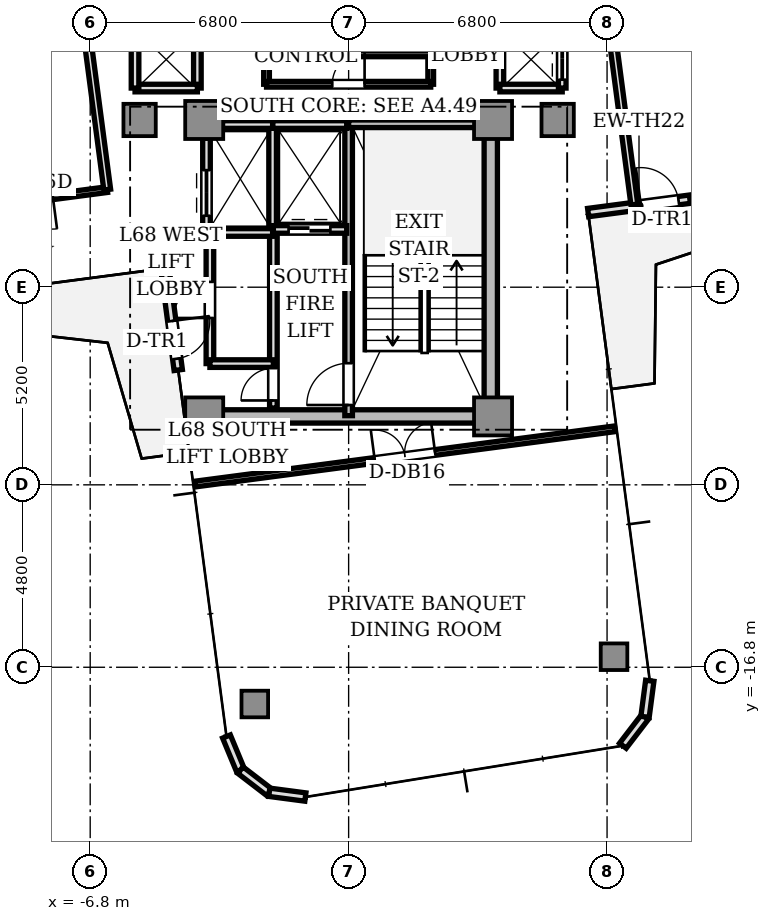
"""IFC4 building model, lengths in metres.
Left out: names, types, materials, properties, quantities, classifications, styles, units other than length and angle.
Written with IfcOpenShell. Run it as: python <this file> out.ifc"""

import sys

from ifc_helpers import new_model, si_unit, direction, frame, frame_2d, origin, origin_2d, place, context, subcontext, project, spatial, rectangle, extrude, source, transform, mapped, element, fill, save


model = new_model("IFC4")
c1 = context("Model", 3, precision=1e-05, world=origin(), true_north=direction((0.0, 1.0)))
c2 = subcontext(c1, "Body", "Model", "MODEL_VIEW")
j1 = project(units=[si_unit("LENGTHUNIT", "METRE"), si_unit("PLANEANGLEUNIT", "RADIAN")], contexts=[c1])
p1 = place(None, origin())
s1 = spatial("IfcSite", under=j1, at=p1, CompositionType="ELEMENT")
p2 = place(p1, origin())
s2 = spatial("IfcBuilding", under=s1, at=p2, CompositionType="ELEMENT")
p3 = place(p2, frame((0.0, 0.0, 244.5)))
s3 = spatial("IfcBuildingStorey", under=s2, at=p3, CompositionType="ELEMENT", Elevation=244.5)
p4 = place(p3, frame((-3.55, -10.2, 0.0), z_axis=(0.0, 0.0, 1.0), x_axis=(1.0, 0.0, 0.0)))
e1 = element("IfcWall", 1, at=p4, inside=s3, PredefinedType="SHEAR", context=c2, shape_type="SweptSolid", body=[
    extrude(rectangle(XDim=7.1, YDim=0.35, at=frame_2d((3.55, 0.0))), origin(), (0.0, 0.0, 1.0), 3.11),
])
p5 = place(p3, frame((3.74, -9.75, 0.0), z_axis=(0.0, 0.0, 1.0), x_axis=(0.0, 1.0, 0.0)))
e2 = element("IfcWall", 2, at=p5, inside=s3, PredefinedType="SHEAR", context=c2, shape_type="SweptSolid", body=[
    extrude(rectangle(XDim=6.9, YDim=0.35, at=frame_2d((3.45, 0.0))), origin(), (0.0, 0.0, 1.0), 3.11),
])
m1 = source(origin(), c2, "Body", "SweptSolid", [
    extrude(rectangle(XDim=1.0, YDim=1.0, at=origin_2d()), origin(), (0.0, 0.0, 1.0), 3.11),
])
for number, where, z_axis, x_axis in (
    (3, (-3.8, -2.4, 0.0), (0.0, 0.0, 1.0), (1.0, 0.0, 0.0)),
    (4, (3.8, -2.4, 0.0), (0.0, 0.0, 1.0), (1.0, 0.0, 0.0)),
    (5, (-3.8, -10.2, 0.0), (0.0, 0.0, 1.0), (1.0, 0.0, 0.0)),
    (6, (3.8, -10.2, 0.0), (0.0, 0.0, 1.0), (1.0, 0.0, 0.0)),
):
    element("IfcColumn", number, at=place(p3, frame(where, z_axis=z_axis, x_axis=x_axis)), inside=s3, PredefinedType="COLUMN", context=c2, shape_type="MappedRepresentation", body=[
        mapped(m1, transform((0.0, 0.0, 0.0), scale=1.0)),
    ])
m2 = source(origin(), c2, "Body", "SweptSolid", [
    extrude(rectangle(XDim=0.85, YDim=0.85, at=origin_2d()), origin(), (0.0, 0.0, 1.0), 3.11),
])
for number, where, z_axis, x_axis in (
    (7, (5.5, -2.4, 0.0), (0.0, 0.0, 1.0), (1.0, 0.0, 0.0)),
    (8, (-5.5, -2.4, 0.0), (0.0, 0.0, 1.0), (1.0, 0.0, 0.0)),
):
    element("IfcColumn", number, at=place(p3, frame(where, z_axis=z_axis, x_axis=x_axis)), inside=s3, PredefinedType="COLUMN", context=c2, shape_type="MappedRepresentation", body=[
        mapped(m2, transform((0.0, 0.0, 0.0), scale=1.0)),
    ])
m3 = source(origin(), c2, "Body", "SweptSolid", [
    extrude(rectangle(XDim=0.7, YDim=0.7, at=origin_2d()), origin(), (0.0, 0.0, 1.0), 3.11),
])
for number, where, z_axis, x_axis in (
    (9, (-2.469, -17.767, 0.0), (0.0, 0.0, 1.0), (1.0, 0.0, 0.0)),
    (10, (6.983, -16.523, 0.0), (0.0, 0.0, 1.0), (1.0, 0.0, 0.0)),
):
    element("IfcColumn", number, at=place(p3, frame(where, z_axis=z_axis, x_axis=x_axis)), inside=s3, PredefinedType="COLUMN", context=c2, shape_type="MappedRepresentation", body=[
        mapped(m3, transform((0.0, 0.0, 0.0), scale=1.0)),
    ])
p6 = place(p3, frame((6.302, -4.836, 0.0), z_axis=(0.0, 0.0, 1.0), x_axis=(0.991451525486, 0.130475563272, 0.0)))
e11 = element("IfcWall", 11, at=p6, inside=s3, PredefinedType="STANDARD", context=c2, shape_type="SweptSolid", body=[
    extrude(rectangle(XDim=2.7, YDim=0.22, at=frame_2d((1.35, 0.0))), origin(), (0.0, 0.0, 1.0), 3.11),
])
p7 = place(p6, frame((1.4, 0.0, 0.0)))
e12 = element("IfcOpeningElement", 12, at=p7, cuts=e11, PredefinedType="OPENING", context=c2, shape_type="SweptSolid", body=[
    extrude(rectangle(XDim=1.0, YDim=2.2, at=frame_2d((0.5, 1.1))), frame((0.0, 0.12, 0.0), z_axis=(0.0, -1.0, 0.0), x_axis=(1.0, 0.0, 0.0)), (0.0, 0.0, 1.0), 0.24),
])
p8 = place(p3, frame((-4.836, -6.302, 0.0), z_axis=(0.0, 0.0, 1.0), x_axis=(0.130475563272, -0.991451525486, 0.0)))
e13 = element("IfcWall", 13, at=p8, inside=s3, PredefinedType="STANDARD", context=c2, shape_type="SweptSolid", body=[
    extrude(rectangle(XDim=2.7, YDim=0.22, at=frame_2d((1.35, 0.0))), origin(), (0.0, 0.0, 1.0), 3.11),
])
p9 = place(p8, frame((1.4, 0.0, 0.0)))
e14 = element("IfcOpeningElement", 14, at=p9, cuts=e13, PredefinedType="OPENING", context=c2, shape_type="SweptSolid", body=[
    extrude(rectangle(XDim=1.0, YDim=2.2, at=frame_2d((0.5, 1.1))), frame((0.0, 0.12, 0.0), z_axis=(0.0, -1.0, 0.0), x_axis=(1.0, 0.0, 0.0)), (0.0, 0.0, 1.0), 0.24),
])
for number, where, z_axis, x_axis in (
    (15, (-3.214, -18.622, 0.0), (0.0, 0.0, 1.0), (0.383, -0.924, 0.0)),
    (16, (-2.847, -19.507, 0.0), (0.0, 0.0, 1.0), (0.793, -0.609, 0.0)),
    (17, (-2.088, -20.09, 0.0), (0.0, 0.0, 1.0), (0.991, -0.131, 0.0)),
    (18, (7.216, -18.865, 0.0), (0.0, 0.0, 1.0), (0.609, 0.793, 0.0)),
    (19, (7.799, -18.105, 0.0), (0.0, 0.0, 1.0), (0.131, 0.991, 0.0)),
):
    element("IfcWall", number, at=place(p3, frame(where, z_axis=z_axis, x_axis=x_axis)), inside=s3, PredefinedType="STANDARD", context=c2, shape_type="SweptSolid", body=[
        extrude(rectangle(XDim=0.958, YDim=0.22, at=frame_2d((0.479, 0.0))), origin(), (0.0, 0.0, 1.0), 3.11),
    ])
p10 = place(p3, frame((0.0, -10.18, 0.0), z_axis=(0.0, 0.0, 1.0), x_axis=(0.0, 1.0, 0.0)))
e20 = element("IfcWall", 20, at=p10, inside=s3, PredefinedType="SOLIDWALL", context=c2, shape_type="SweptSolid", body=[
    extrude(rectangle(XDim=7.68, YDim=0.2, at=frame_2d((3.84, 0.0))), origin(), (0.0, 0.0, 1.0), 3.11),
])
p11 = place(p10, frame((0.28, 0.0, 0.0)))
e21 = element("IfcOpeningElement", 21, at=p11, cuts=e20, PredefinedType="OPENING", context=c2, shape_type="SweptSolid", body=[
    extrude(rectangle(XDim=1.1, YDim=2.15, at=frame_2d((0.55, 1.075))), frame((0.0, 0.11, 0.0), z_axis=(0.0, -1.0, 0.0), x_axis=(1.0, 0.0, 0.0)), (0.0, 0.0, 1.0), 0.22),
])
p12 = place(p3, frame((0.0, -2.5, 0.0), z_axis=(0.0, 0.0, 1.0), x_axis=(1.0, 0.0, 0.0)))
e22 = element("IfcWall", 22, at=p12, inside=s3, PredefinedType="SOLIDWALL", context=c2, shape_type="SweptSolid", body=[
    extrude(rectangle(XDim=3.72, YDim=0.2, at=frame_2d((1.86, 0.0))), origin(), (0.0, 0.0, 1.0), 3.11),
])
p13 = place(p3, frame((-1.98, -9.98, 0.0), z_axis=(0.0, 0.0, 1.0), x_axis=(0.0, 1.0, 0.0)))
e23 = element("IfcWall", 23, at=p13, inside=s3, PredefinedType="SOLIDWALL", context=c2, shape_type="SweptSolid", body=[
    extrude(rectangle(XDim=4.66, YDim=0.2, at=frame_2d((2.33, 0.0))), origin(), (0.0, 0.0, 1.0), 2.66),
])
p14 = place(p13, frame((0.2, 0.0, 0.0)))
e24 = element("IfcOpeningElement", 24, at=p14, cuts=e23, PredefinedType="OPENING", context=c2, shape_type="SweptSolid", body=[
    extrude(rectangle(XDim=0.85, YDim=2.1, at=frame_2d((0.425, 1.05))), frame((0.0, 0.11, 0.0), z_axis=(0.0, -1.0, 0.0), x_axis=(1.0, 0.0, 0.0)), (0.0, 0.0, 1.0), 0.22),
])
p15 = place(p3, frame((-2.0, -5.28, 0.0), z_axis=(0.0, 0.0, 1.0), x_axis=(0.0, 1.0, 0.0)))
e25 = element("IfcWall", 25, at=p15, inside=s3, PredefinedType="SOLIDWALL", context=c2, shape_type="SweptSolid", body=[
    extrude(rectangle(XDim=2.78, YDim=0.2, at=frame_2d((1.39, 0.0))), origin(), (0.0, 0.0, 1.0), 2.66),
])
p16 = place(p3, frame((-2.0, -2.52, 0.0), z_axis=(0.0, 0.0, 1.0), x_axis=(1.0, 0.0, 0.0)))
e26 = element("IfcWall", 26, at=p16, inside=s3, PredefinedType="SOLIDWALL", context=c2, shape_type="SweptSolid", body=[
    extrude(rectangle(XDim=1.95, YDim=0.2, at=frame_2d((0.975, 0.0))), origin(), (0.0, 0.0, 1.0), 2.66),
])
p17 = place(p3, frame((-1.98, -5.28, 0.0), z_axis=(0.0, 0.0, 1.0), x_axis=(1.0, 0.0, 0.0)))
e27 = element("IfcWall", 27, at=p17, inside=s3, PredefinedType="SOLIDWALL", context=c2, shape_type="SweptSolid", body=[
    extrude(rectangle(XDim=1.93, YDim=0.2, at=frame_2d((0.965, 0.0))), origin(), (0.0, 0.0, 1.0), 2.66),
])
p18 = place(p17, frame((0.4, 0.0, 0.0)))
e28 = element("IfcOpeningElement", 28, at=p18, cuts=e27, PredefinedType="OPENING", context=c2, shape_type="SweptSolid", body=[
    extrude(rectangle(XDim=1.1, YDim=2.2, at=frame_2d((0.55, 1.1))), frame((0.0, 0.11, 0.0), z_axis=(0.0, -1.0, 0.0), x_axis=(1.0, 0.0, 0.0)), (0.0, 0.0, 1.0), 0.22),
])
p19 = place(p3, frame((-3.32, -2.52, 0.0), z_axis=(0.0, 0.0, 1.0), x_axis=(1.0, 0.0, 0.0)))
e29 = element("IfcWall", 29, at=p19, inside=s3, PredefinedType="SOLIDWALL", context=c2, shape_type="SweptSolid", body=[
    extrude(rectangle(XDim=1.32, YDim=0.2, at=frame_2d((0.66, 0.0))), origin(), (0.0, 0.0, 1.0), 2.66),
])
p20 = place(p3, frame((-3.74, -5.36, 0.0), z_axis=(0.0, 0.0, 1.0), x_axis=(1.0, 0.0, 0.0)))
e30 = element("IfcWall", 30, at=p20, inside=s3, PredefinedType="SOLIDWALL", context=c2, shape_type="SweptSolid", body=[
    extrude(rectangle(XDim=1.74, YDim=0.2, at=frame_2d((0.87, 0.0))), origin(), (0.0, 0.0, 1.0), 2.66),
])
p21 = place(p3, frame((-3.74, -5.36, 0.0), z_axis=(0.0, 0.0, 1.0), x_axis=(0.0, 1.0, 0.0)))
e31 = element("IfcWall", 31, at=p21, inside=s3, PredefinedType="SOLIDWALL", context=c2, shape_type="SweptSolid", body=[
    extrude(rectangle(XDim=2.48, YDim=0.2, at=frame_2d((1.24, 0.0))), origin(), (0.0, 0.0, 1.0), 2.66),
])
p22 = place(p21, frame((0.44, 0.0, 0.0)))
e32 = element("IfcOpeningElement", 32, at=p22, cuts=e31, PredefinedType="OPENING", context=c2, shape_type="SweptSolid", body=[
    extrude(rectangle(XDim=1.2, YDim=2.2, at=frame_2d((0.6, 1.1))), frame((0.0, 0.11, 0.0), z_axis=(0.0, -1.0, 0.0), x_axis=(1.0, 0.0, 0.0)), (0.0, 0.0, 1.0), 0.22),
])
p23 = place(p3, frame((3.98, -1.56, 0.0), z_axis=(0.0, 0.0, 1.0), x_axis=(0.0, 1.0, 0.0)))
e33 = element("IfcWall", 33, at=p23, inside=s3, PredefinedType="SOLIDWALL", context=c2, shape_type="SweptSolid", body=[
    extrude(rectangle(XDim=3.12, YDim=0.2, at=frame_2d((1.56, 0.0))), origin(), (0.0, 0.0, 1.0), 2.33),
])
p24 = place(p3, frame((3.98, -1.56, 0.0), z_axis=(0.0, 0.0, 1.0), x_axis=(1.0, 0.0, 0.0)))
e34 = element("IfcWall", 34, at=p24, inside=s3, PredefinedType="SOLIDWALL", context=c2, shape_type="SweptSolid", body=[
    extrude(rectangle(XDim=1.64, YDim=0.2, at=frame_2d((0.82, 0.0))), origin(), (0.0, 0.0, 1.0), 2.66),
])
p25 = place(p3, frame((5.62, -1.56, 0.0), z_axis=(0.0, 0.0, 1.0), x_axis=(0.0, 1.0, 0.0)))
e35 = element("IfcWall", 35, at=p25, inside=s3, PredefinedType="SOLIDWALL", context=c2, shape_type="SweptSolid", body=[
    extrude(rectangle(XDim=1.56, YDim=0.2, at=frame_2d((0.78, 0.0))), origin(), (0.0, 0.0, 1.0), 2.66),
])
p26 = place(p25, frame((0.22, 0.0, 0.0)))
e36 = element("IfcOpeningElement", 36, at=p26, cuts=e35, PredefinedType="OPENING", context=c2, shape_type="SweptSolid", body=[
    extrude(rectangle(XDim=1.1, YDim=2.2, at=frame_2d((0.55, 1.1))), frame((0.0, 0.11, 0.0), z_axis=(0.0, -1.0, 0.0), x_axis=(1.0, 0.0, 0.0)), (0.0, 0.0, 1.0), 0.22),
])
p27 = place(p3, frame((-3.98, -1.56, 0.0), z_axis=(0.0, 0.0, 1.0), x_axis=(0.0, 1.0, 0.0)))
e37 = element("IfcWall", 37, at=p27, inside=s3, PredefinedType="SOLIDWALL", context=c2, shape_type="SweptSolid", body=[
    extrude(rectangle(XDim=3.12, YDim=0.2, at=frame_2d((1.56, 0.0))), origin(), (0.0, 0.0, 1.0), 2.33),
])
p28 = place(p3, frame((-5.62, -1.56, 0.0), z_axis=(0.0, 0.0, 1.0), x_axis=(1.0, 0.0, 0.0)))
e38 = element("IfcWall", 38, at=p28, inside=s3, PredefinedType="SOLIDWALL", context=c2, shape_type="SweptSolid", body=[
    extrude(rectangle(XDim=1.64, YDim=0.2, at=frame_2d((0.82, 0.0))), origin(), (0.0, 0.0, 1.0), 2.66),
])
p29 = place(p3, frame((-5.62, -1.56, 0.0), z_axis=(0.0, 0.0, 1.0), x_axis=(0.0, 1.0, 0.0)))
e39 = element("IfcWall", 39, at=p29, inside=s3, PredefinedType="SOLIDWALL", context=c2, shape_type="SweptSolid", body=[
    extrude(rectangle(XDim=1.56, YDim=0.2, at=frame_2d((0.78, 0.0))), origin(), (0.0, 0.0, 1.0), 2.66),
])
p30 = place(p3, frame((-3.65, -8.81, 0.0), z_axis=(0.0, 0.0, 1.0), x_axis=(0.0, 1.0, 0.0)))
e40 = element("IfcWall", 40, at=p30, inside=s3, PredefinedType="SOLIDWALL", context=c2, shape_type="SweptSolid", body=[
    extrude(rectangle(XDim=3.43, YDim=0.2, at=frame_2d((1.715, 0.0))), origin(), (0.0, 0.0, 1.0), 2.66),
])
p31 = place(p30, frame((1.2, 0.0, 0.0)))
e41 = element("IfcOpeningElement", 41, at=p31, cuts=e40, PredefinedType="OPENING", context=c2, shape_type="SweptSolid", body=[
    extrude(rectangle(XDim=0.95, YDim=2.15, at=frame_2d((0.475, 1.075))), frame((0.0, 0.11, 0.0), z_axis=(0.0, -1.0, 0.0), x_axis=(1.0, 0.0, 0.0)), (0.0, 0.0, 1.0), 0.22),
])
p32 = place(p3, frame((-3.65, -8.81, 0.0), z_axis=(0.0, 0.0, 1.0), x_axis=(1.0, 0.0, 0.0)))
e42 = element("IfcWall", 42, at=p32, inside=s3, PredefinedType="SOLIDWALL", context=c2, shape_type="SweptSolid", body=[
    extrude(rectangle(XDim=1.67, YDim=0.2, at=frame_2d((0.835, 0.0))), origin(), (0.0, 0.0, 1.0), 2.66),
])
p33 = place(p3, frame((2.16, -1.46, 0.0), z_axis=(0.0, 0.0, 1.0), x_axis=(0.0, 1.0, 0.0)))
e43 = element("IfcWall", 43, at=p33, inside=s3, PredefinedType="PARTITIONING", context=c2, shape_type="SweptSolid", body=[
    extrude(rectangle(XDim=2.92, YDim=0.15, at=frame_2d((1.46, 0.0))), origin(), (0.0, 0.0, 1.0), 2.66),
])
p34 = place(p33, frame((1.035, 0.0, 0.0)))
e44 = element("IfcOpeningElement", 44, at=p34, cuts=e43, PredefinedType="OPENING", context=c2, shape_type="SweptSolid", body=[
    extrude(rectangle(XDim=0.85, YDim=2.1, at=frame_2d((0.425, 1.05))), frame((0.0, 0.085, 0.0), z_axis=(0.0, -1.0, 0.0), x_axis=(1.0, 0.0, 0.0)), (0.0, 0.0, 1.0), 0.17),
])
p35 = place(p3, frame((-2.16, -1.46, 0.0), z_axis=(0.0, 0.0, 1.0), x_axis=(0.0, 1.0, 0.0)))
e45 = element("IfcWall", 45, at=p35, inside=s3, PredefinedType="PARTITIONING", context=c2, shape_type="SweptSolid", body=[
    extrude(rectangle(XDim=2.92, YDim=0.15, at=frame_2d((1.46, 0.0))), origin(), (0.0, 0.0, 1.0), 2.66),
])
p36 = place(p3, frame((-2.16, -1.46, 0.0), z_axis=(0.0, 0.0, 1.0), x_axis=(1.0, 0.0, 0.0)))
e46 = element("IfcWall", 46, at=p36, inside=s3, PredefinedType="PARTITIONING", context=c2, shape_type="SweptSolid", body=[
    extrude(rectangle(XDim=4.32, YDim=0.15, at=frame_2d((2.16, 0.0))), origin(), (0.0, 0.0, 1.0), 2.66),
])
p37 = place(p36, frame((1.73, 0.0, 0.0)))
e47 = element("IfcOpeningElement", 47, at=p37, cuts=e46, PredefinedType="OPENING", context=c2, shape_type="SweptSolid", body=[
    extrude(rectangle(XDim=0.85, YDim=2.1, at=frame_2d((0.425, 1.05))), frame((0.0, 0.085, 0.0), z_axis=(0.0, -1.0, 0.0), x_axis=(1.0, 0.0, 0.0)), (0.0, 0.0, 1.0), 0.17),
])
p38 = place(p3, frame((-2.16, -0.66, 0.0), z_axis=(0.0, 0.0, 1.0), x_axis=(1.0, 0.0, 0.0)))
e48 = element("IfcWall", 48, at=p38, inside=s3, PredefinedType="PARTITIONING", context=c2, shape_type="SweptSolid", body=[
    extrude(rectangle(XDim=4.32, YDim=0.15, at=frame_2d((2.16, 0.0))), origin(), (0.0, 0.0, 1.0), 2.66),
])
p39 = place(p3, frame((7.518, -4.625, 0.0), z_axis=(0.0, 0.0, 1.0), x_axis=(-0.130559839157, 0.99144043109, 0.0)))
e49 = element("IfcWall", 49, at=p39, inside=s3, PredefinedType="PARTITIONING", context=c2, shape_type="SweptSolid", body=[
    extrude(rectangle(XDim=4.617, YDim=0.18, at=frame_2d((2.309, 0.0))), origin(), (0.0, 0.0, 1.0), 2.66),
])
p40 = place(p3, frame((-6.352, -4.232, 0.0), z_axis=(0.0, 0.0, 1.0), x_axis=(-0.991446823881, -0.130511284629, 0.0)))
e50 = element("IfcWall", 50, at=p40, inside=s3, PredefinedType="PARTITIONING", context=c2, shape_type="SweptSolid", body=[
    extrude(rectangle(XDim=8.343, YDim=0.15, at=frame_2d((4.171, 0.0))), origin(), (0.0, 0.0, 1.0), 2.66),
])
p41 = place(p40, frame((1.444, 0.0, 0.0)))
e51 = element("IfcOpeningElement", 51, at=p41, cuts=e50, PredefinedType="OPENING", context=c2, shape_type="SweptSolid", body=[
    extrude(rectangle(XDim=0.85, YDim=2.1, at=frame_2d((0.425, 1.05))), frame((0.0, 0.085, 0.0), z_axis=(0.0, -1.0, 0.0), x_axis=(1.0, 0.0, 0.0)), (0.0, 0.0, 1.0), 0.17),
])
p42 = place(p40, frame((4.641, 0.0, 0.0)))
e52 = element("IfcOpeningElement", 52, at=p42, cuts=e50, PredefinedType="OPENING", context=c2, shape_type="SweptSolid", body=[
    extrude(rectangle(XDim=0.85, YDim=2.1, at=frame_2d((0.425, 1.05))), frame((0.0, 0.085, 0.0), z_axis=(0.0, -1.0, 0.0), x_axis=(1.0, 0.0, 0.0)), (0.0, 0.0, 1.0), 0.17),
])
p43 = place(p3, frame((-7.518, 4.625, 0.0), z_axis=(0.0, 0.0, 1.0), x_axis=(0.130540045477, -0.991443037459, 0.0)))
e53 = element("IfcWall", 53, at=p43, inside=s3, PredefinedType="PARTITIONING", context=c2, shape_type="SweptSolid", body=[
    extrude(rectangle(XDim=8.934, YDim=0.18, at=frame_2d((4.467, 0.0))), origin(), (0.0, 0.0, 1.0), 2.66),
])
p44 = place(p3, frame((-4.038, -11.979, 0.0), z_axis=(0.0, 0.0, 1.0), x_axis=(0.991446382373, 0.130514638561, 0.0)))
e54 = element("IfcWall", 54, at=p44, inside=s3, PredefinedType="PARTITIONING", context=c2, shape_type="SweptSolid", body=[
    extrude(rectangle(XDim=11.134, YDim=0.15, at=frame_2d((5.567, 0.0))), origin(), (0.0, 0.0, 1.0), 2.66),
])
p45 = place(p44, frame((4.767, 0.0, 0.0)))
e55 = element("IfcOpeningElement", 55, at=p45, cuts=e54, PredefinedType="OPENING", context=c2, shape_type="SweptSolid", body=[
    extrude(rectangle(XDim=1.6, YDim=2.25, at=frame_2d((0.8, 1.125))), frame((0.0, 0.085, 0.0), z_axis=(0.0, -1.0, 0.0), x_axis=(1.0, 0.0, 0.0)), (0.0, 0.0, 1.0), 0.17),
])
m4 = source(origin(), c2, "Body", "SweptSolid", [
    extrude(rectangle(XDim=1.0, YDim=0.05, at=origin_2d()), origin(), (0.0, 0.0, 1.0), 2.2),
])
p46 = place(p7, frame((0.5, 0.0, 0.0)))
e56 = element("IfcDoor", 56, at=p46, inside=s3, OperationType="SINGLE_SWING_LEFT", PredefinedType="DOOR", context=c2, shape_type="MappedRepresentation", body=[
    mapped(m4, transform((0.0, 0.0, 0.0), scale=1.0)),
])
fill(e12, e56)
p47 = place(p9, frame((0.5, 0.0, 0.0)))
e57 = element("IfcDoor", 57, at=p47, inside=s3, OperationType="SINGLE_SWING_LEFT", PredefinedType="DOOR", context=c2, shape_type="MappedRepresentation", body=[
    mapped(m4, transform((0.0, 0.0, 0.0), scale=1.0)),
])
fill(e14, e57)
m5 = source(origin(), c2, "Body", "SweptSolid", [
    extrude(rectangle(XDim=1.1, YDim=0.05, at=origin_2d()), origin(), (0.0, 0.0, 1.0), 2.15),
])
p48 = place(p11, frame((0.55, 0.0, 0.0)))
e58 = element("IfcDoor", 58, at=p48, inside=s3, OperationType="SINGLE_SWING_LEFT", PredefinedType="DOOR", context=c2, shape_type="MappedRepresentation", body=[
    mapped(m5, transform((0.0, 0.0, 0.0), scale=1.0)),
])
fill(e21, e58)
m6 = source(origin(), c2, "Body", "SweptSolid", [
    extrude(rectangle(XDim=0.85, YDim=0.05, at=origin_2d()), origin(), (0.0, 0.0, 1.0), 2.1),
])
p49 = place(p14, frame((0.425, 0.0, 0.0)))
e59 = element("IfcDoor", 59, at=p49, inside=s3, OperationType="SINGLE_SWING_LEFT", PredefinedType="DOOR", context=c2, shape_type="MappedRepresentation", body=[
    mapped(m6, transform((0.0, 0.0, 0.0), scale=1.0)),
])
fill(e24, e59)
m7 = source(origin(), c2, "Body", "SweptSolid", [
    extrude(rectangle(XDim=1.1, YDim=0.05, at=origin_2d()), origin(), (0.0, 0.0, 1.0), 2.2),
])
p50 = place(p18, frame((0.55, 0.0, 0.0)))
e60 = element("IfcDoor", 60, at=p50, inside=s3, OperationType="DOUBLE_DOOR_SLIDING", PredefinedType="DOOR", context=c2, shape_type="MappedRepresentation", body=[
    mapped(m7, transform((0.0, 0.0, 0.0), scale=1.0)),
])
fill(e28, e60)
m8 = source(origin(), c2, "Body", "SweptSolid", [
    extrude(rectangle(XDim=1.2, YDim=0.05, at=origin_2d()), origin(), (0.0, 0.0, 1.0), 2.2),
])
p51 = place(p22, frame((0.6, 0.0, 0.0)))
e61 = element("IfcDoor", 61, at=p51, inside=s3, OperationType="DOUBLE_DOOR_SLIDING", PredefinedType="DOOR", context=c2, shape_type="MappedRepresentation", body=[
    mapped(m8, transform((0.0, 0.0, 0.0), scale=1.0)),
])
fill(e32, e61)
p52 = place(p26, frame((0.55, 0.0, 0.0)))
e62 = element("IfcDoor", 62, at=p52, inside=s3, OperationType="DOUBLE_DOOR_SLIDING", PredefinedType="DOOR", context=c2, shape_type="MappedRepresentation", body=[
    mapped(m7, transform((0.0, 0.0, 0.0), scale=1.0)),
])
fill(e36, e62)
m9 = source(origin(), c2, "Body", "SweptSolid", [
    extrude(rectangle(XDim=0.95, YDim=0.05, at=origin_2d()), origin(), (0.0, 0.0, 1.0), 2.15),
])
p53 = place(p31, frame((0.475, 0.0, 0.0)))
e63 = element("IfcDoor", 63, at=p53, inside=s3, OperationType="SINGLE_SWING_LEFT", PredefinedType="DOOR", context=c2, shape_type="MappedRepresentation", body=[
    mapped(m9, transform((0.0, 0.0, 0.0), scale=1.0)),
])
fill(e41, e63)
p54 = place(p37, frame((0.425, 0.0, 0.0)))
e64 = element("IfcDoor", 64, at=p54, inside=s3, OperationType="SINGLE_SWING_RIGHT", PredefinedType="DOOR", context=c2, shape_type="MappedRepresentation", body=[
    mapped(m6, transform((0.0, 0.0, 0.0), scale=1.0)),
])
fill(e47, e64)
p55 = place(p41, frame((0.425, 0.0, 0.0)))
e65 = element("IfcDoor", 65, at=p55, inside=s3, OperationType="SINGLE_SWING_LEFT", PredefinedType="DOOR", context=c2, shape_type="MappedRepresentation", body=[
    mapped(m6, transform((0.0, 0.0, 0.0), scale=1.0)),
])
fill(e51, e65)
m10 = source(origin(), c2, "Body", "SweptSolid", [
    extrude(rectangle(XDim=1.6, YDim=0.05, at=origin_2d()), origin(), (0.0, 0.0, 1.0), 2.25),
])
p56 = place(p45, frame((0.8, 0.0, 0.0)))
e66 = element("IfcDoor", 66, at=p56, inside=s3, OperationType="DOUBLE_DOOR_SINGLE_SWING", PredefinedType="DOOR", context=c2, shape_type="MappedRepresentation", body=[
    mapped(m10, transform((0.0, 0.0, 0.0), scale=1.0)),
])
fill(e55, e66)
save(model, sys.argv[1])
